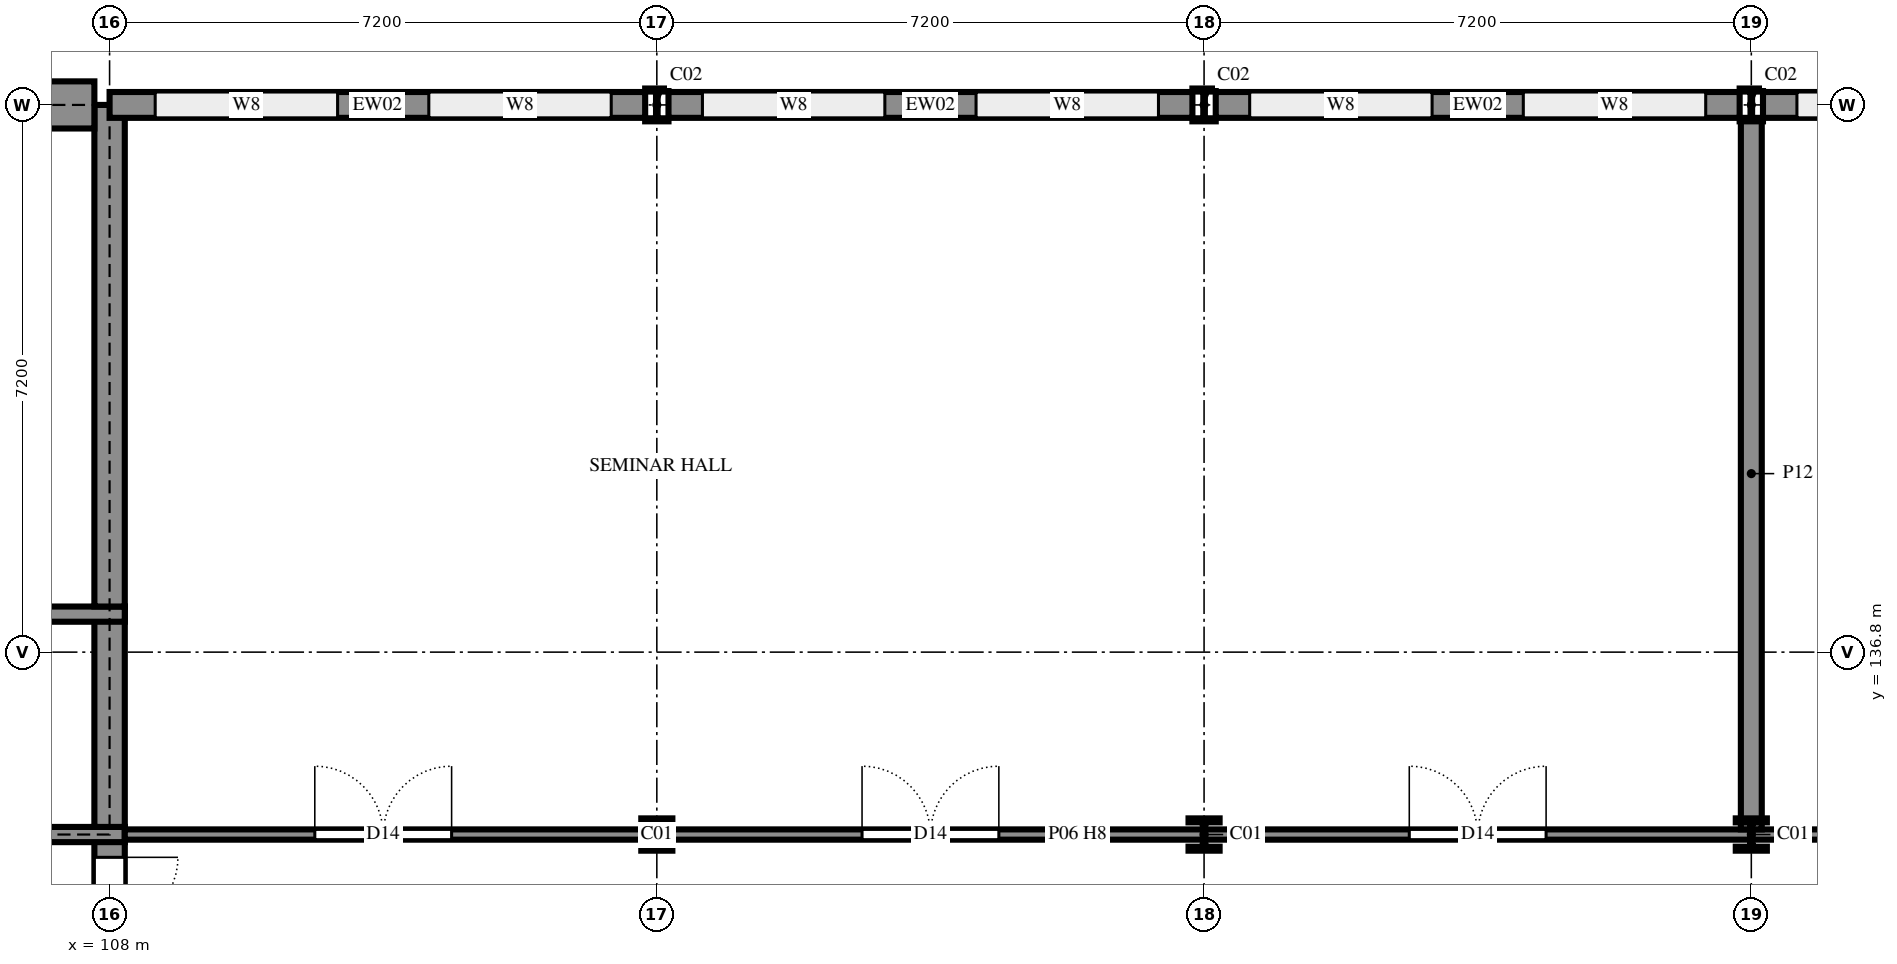
"""IFC4 building model, lengths in metres.
Left out: names, types, materials, properties, quantities, classifications, styles, units other than length and angle.
Written with IfcOpenShell. Run it as: python <this file> out.ifc"""

import sys

from ifc_helpers import new_model, si_unit, direction, frame, frame_2d, origin, origin_2d, place, context, subcontext, project, spatial, rectangle, i_section, extrude, element, fill, save


model = new_model("IFC4")
c1 = context("Model", 3, precision=1e-05, world=origin(), true_north=direction((0.0, 1.0)))
c2 = subcontext(c1, "Body", "Model", "MODEL_VIEW")
j1 = project(units=[si_unit("LENGTHUNIT", "METRE"), si_unit("PLANEANGLEUNIT", "RADIAN")], contexts=[c1])
p1 = place(None, origin())
s1 = spatial("IfcSite", under=j1, at=p1, CompositionType="ELEMENT")
p2 = place(p1, origin())
s2 = spatial("IfcBuilding", under=s1, at=p2, CompositionType="ELEMENT")
p3 = place(p2, frame((0.0, 0.0, 18.0)))
s3 = spatial("IfcBuildingStorey", under=s2, at=p3, CompositionType="ELEMENT", Elevation=18.0)
p4 = place(p3, frame((115.2, 134.4, 0.0), z_axis=(0.0, 0.0, 1.0), x_axis=(1.0, 0.0, 0.0)))
e1 = element("IfcColumn", 1, at=p4, inside=s3, PredefinedType="COLUMN", context=c2, shape_type="SweptSolid", body=[
    extrude(i_section(OverallWidth=0.409, OverallDepth=0.425, WebThickness=0.033, FlangeThickness=0.052, FilletRadius=0.015, at=origin_2d()), origin(), (0.0, 0.0, 1.0), 3.6),
])
p5 = place(p3, frame((115.2, 144.0, 0.0), z_axis=(0.0, 0.0, 1.0), x_axis=(1.0, 0.0, 0.0)))
e2 = element("IfcColumn", 2, at=p5, inside=s3, PredefinedType="COLUMN", context=c2, shape_type="SweptSolid", body=[
    extrude(i_section(OverallWidth=0.307, OverallDepth=0.432, WebThickness=0.021, FlangeThickness=0.04, FilletRadius=0.027, at=origin_2d()), origin(), (0.0, 0.0, 1.0), 3.6),
])
p6 = place(p3, frame((122.4, 134.4, 0.0), z_axis=(0.0, 0.0, 1.0), x_axis=(1.0, 0.0, 0.0)))
e3 = element("IfcColumn", 3, at=p6, inside=s3, PredefinedType="COLUMN", context=c2, shape_type="SweptSolid", body=[
    extrude(i_section(OverallWidth=0.409, OverallDepth=0.425, WebThickness=0.033, FlangeThickness=0.052, FilletRadius=0.015, at=origin_2d()), origin(), (0.0, 0.0, 1.0), 3.6),
])
p7 = place(p3, frame((122.4, 144.0, 0.0), z_axis=(0.0, 0.0, 1.0), x_axis=(1.0, 0.0, 0.0)))
e4 = element("IfcColumn", 4, at=p7, inside=s3, PredefinedType="COLUMN", context=c2, shape_type="SweptSolid", body=[
    extrude(i_section(OverallWidth=0.307, OverallDepth=0.432, WebThickness=0.021, FlangeThickness=0.04, FilletRadius=0.027, at=origin_2d()), origin(), (0.0, 0.0, 1.0), 3.6),
])
p8 = place(p3, frame((129.6, 134.4, 0.0), z_axis=(0.0, 0.0, 1.0), x_axis=(1.0, 0.0, 0.0)))
e5 = element("IfcColumn", 5, at=p8, inside=s3, PredefinedType="COLUMN", context=c2, shape_type="SweptSolid", body=[
    extrude(i_section(OverallWidth=0.409, OverallDepth=0.425, WebThickness=0.033, FlangeThickness=0.052, FilletRadius=0.015, at=origin_2d()), origin(), (0.0, 0.0, 1.0), 3.6),
])
p9 = place(p3, frame((129.6, 144.0, 0.0), z_axis=(0.0, 0.0, 1.0), x_axis=(1.0, 0.0, 0.0)))
e6 = element("IfcColumn", 6, at=p9, inside=s3, PredefinedType="COLUMN", context=c2, shape_type="SweptSolid", body=[
    extrude(i_section(OverallWidth=0.307, OverallDepth=0.432, WebThickness=0.021, FlangeThickness=0.04, FilletRadius=0.027, at=origin_2d()), origin(), (0.0, 0.0, 1.0), 3.6),
])
p10 = place(p3, frame((108.0, 132.0, 0.0), z_axis=(0.0, 0.0, 1.0), x_axis=(0.0, 1.0, 0.0)))
e7 = element("IfcWall", 7, at=p10, inside=s3, PredefinedType="SHEAR", context=c2, shape_type="SweptSolid", body=[
    extrude(rectangle(XDim=2.5, YDim=0.4, at=frame_2d((1.25, 0.0))), origin(), (0.0, 0.0, 1.0), 3.6),
])
p11 = place(p10, frame((0.3, 0.0, 0.0)))
e8 = element("IfcOpeningElement", 8, at=p11, cuts=e7, PredefinedType="OPENING", context=c2, shape_type="SweptSolid", body=[
    extrude(rectangle(XDim=1.8, YDim=2.1, at=frame_2d((0.9, 1.05))), frame((0.0, 0.21, 0.0), z_axis=(0.0, -1.0, 0.0), x_axis=(1.0, 0.0, 0.0)), (0.0, 0.0, 1.0), 0.42),
])
p12 = place(p3, frame((104.1, 134.4, 0.0), z_axis=(0.0, 0.0, 1.0), x_axis=(1.0, 0.0, 0.0)))
e9 = element("IfcWall", 9, at=p12, inside=s3, PredefinedType="SHEAR", context=c2, shape_type="SweptSolid", body=[
    extrude(rectangle(XDim=4.1, YDim=0.2, at=frame_2d((2.05, 0.0))), origin(), (0.0, 0.0, 1.0), 3.6),
])
p13 = place(p12, frame((1.475, 0.0, 0.0)))
e10 = element("IfcOpeningElement", 10, at=p13, cuts=e9, PredefinedType="OPENING", context=c2, shape_type="SweptSolid", body=[
    extrude(rectangle(XDim=0.85, YDim=2.1, at=frame_2d((0.425, 1.05))), frame((0.0, 0.11, 0.0), z_axis=(0.0, -1.0, 0.0), x_axis=(1.0, 0.0, 0.0)), (0.0, 0.0, 1.0), 0.22),
])
p14 = place(p3, frame((108.0, 134.5, 0.0), z_axis=(0.0, 0.0, 1.0), x_axis=(0.0, 1.0, 0.0)))
e11 = element("IfcWall", 11, at=p14, inside=s3, PredefinedType="SHEAR", context=c2, shape_type="SweptSolid", body=[
    extrude(rectangle(XDim=2.9, YDim=0.4, at=frame_2d((1.45, 0.0))), origin(), (0.0, 0.0, 1.0), 3.6),
])
p15 = place(p3, frame((108.2, 137.3, 0.0), z_axis=(0.0, 0.0, 1.0), x_axis=(-1.0, 0.0, 0.0)))
e12 = element("IfcWall", 12, at=p15, inside=s3, PredefinedType="SHEAR", context=c2, shape_type="SweptSolid", body=[
    extrude(rectangle(XDim=4.1, YDim=0.2, at=frame_2d((2.05, 0.0))), origin(), (0.0, 0.0, 1.0), 3.6),
])
p16 = place(p3, frame((108.0, 137.4, 0.0), z_axis=(0.0, 0.0, 1.0), x_axis=(0.0, 1.0, 0.0)))
e13 = element("IfcWall", 13, at=p16, inside=s3, PredefinedType="SHEAR", context=c2, shape_type="SweptSolid", body=[
    extrude(rectangle(XDim=6.6, YDim=0.4, at=frame_2d((3.3, 0.0))), origin(), (0.0, 0.0, 1.0), 3.6),
])
p17 = place(p3, frame((133.4, 144.0, 0.0), z_axis=(0.0, 0.0, 1.0), x_axis=(-1.0, 0.0, 0.0)))
e14 = element("IfcWall", 14, at=p17, inside=s3, PredefinedType="SOLIDWALL", context=c2, shape_type="SweptSolid", body=[
    extrude(rectangle(XDim=3.646, YDim=0.34, at=frame_2d((1.823, 0.0))), origin(), (0.0, 0.0, 1.0), 3.26),
])
p18 = place(p17, frame((0.8, 0.0, 0.9)))
e15 = element("IfcOpeningElement", 15, at=p18, cuts=e14, PredefinedType="OPENING", context=c2, shape_type="SweptSolid", body=[
    extrude(rectangle(XDim=2.4, YDim=1.8, at=frame_2d((1.2, 0.9))), frame((0.0, 0.18, 0.0), z_axis=(0.0, -1.0, 0.0), x_axis=(1.0, 0.0, 0.0)), (0.0, 0.0, 1.0), 0.36),
])
p19 = place(p3, frame((129.447, 144.0, 0.0), z_axis=(0.0, 0.0, 1.0), x_axis=(-1.0, 0.0, 0.0)))
e16 = element("IfcWall", 16, at=p19, inside=s3, PredefinedType="SOLIDWALL", context=c2, shape_type="SweptSolid", body=[
    extrude(rectangle(XDim=6.893, YDim=0.34, at=frame_2d((3.447, 0.0))), origin(), (0.0, 0.0, 1.0), 3.16),
])
p20 = place(p19, frame((4.046, 0.0, 0.9)))
e17 = element("IfcOpeningElement", 17, at=p20, cuts=e16, PredefinedType="OPENING", context=c2, shape_type="SweptSolid", body=[
    extrude(rectangle(XDim=2.4, YDim=1.8, at=frame_2d((1.2, 0.9))), frame((0.0, 0.18, 0.0), z_axis=(0.0, -1.0, 0.0), x_axis=(1.0, 0.0, 0.0)), (0.0, 0.0, 1.0), 0.36),
])
p21 = place(p19, frame((0.447, 0.0, 0.9)))
e18 = element("IfcOpeningElement", 18, at=p21, cuts=e16, PredefinedType="OPENING", context=c2, shape_type="SweptSolid", body=[
    extrude(rectangle(XDim=2.4, YDim=1.8, at=frame_2d((1.2, 0.9))), frame((0.0, 0.18, 0.0), z_axis=(0.0, -1.0, 0.0), x_axis=(1.0, 0.0, 0.0)), (0.0, 0.0, 1.0), 0.36),
])
p22 = place(p3, frame((122.247, 144.0, 0.0), z_axis=(0.0, 0.0, 1.0), x_axis=(-1.0, 0.0, 0.0)))
e19 = element("IfcWall", 19, at=p22, inside=s3, PredefinedType="SOLIDWALL", context=c2, shape_type="SweptSolid", body=[
    extrude(rectangle(XDim=6.893, YDim=0.34, at=frame_2d((3.447, 0.0))), origin(), (0.0, 0.0, 1.0), 3.16),
])
p23 = place(p22, frame((4.046, 0.0, 0.9)))
e20 = element("IfcOpeningElement", 20, at=p23, cuts=e19, PredefinedType="OPENING", context=c2, shape_type="SweptSolid", body=[
    extrude(rectangle(XDim=2.4, YDim=1.8, at=frame_2d((1.2, 0.9))), frame((0.0, 0.18, 0.0), z_axis=(0.0, -1.0, 0.0), x_axis=(1.0, 0.0, 0.0)), (0.0, 0.0, 1.0), 0.36),
])
p24 = place(p22, frame((0.447, 0.0, 0.9)))
e21 = element("IfcOpeningElement", 21, at=p24, cuts=e19, PredefinedType="OPENING", context=c2, shape_type="SweptSolid", body=[
    extrude(rectangle(XDim=2.4, YDim=1.8, at=frame_2d((1.2, 0.9))), frame((0.0, 0.18, 0.0), z_axis=(0.0, -1.0, 0.0), x_axis=(1.0, 0.0, 0.0)), (0.0, 0.0, 1.0), 0.36),
])
p25 = place(p3, frame((115.046, 144.0, 0.0), z_axis=(0.0, 0.0, 1.0), x_axis=(-1.0, 0.0, 0.0)))
e22 = element("IfcWall", 22, at=p25, inside=s3, PredefinedType="SOLIDWALL", context=c2, shape_type="SweptSolid", body=[
    extrude(rectangle(XDim=7.046, YDim=0.34, at=frame_2d((3.523, 0.0))), origin(), (0.0, 0.0, 1.0), 3.16),
])
p26 = place(p25, frame((4.046, 0.0, 0.9)))
e23 = element("IfcOpeningElement", 23, at=p26, cuts=e22, PredefinedType="OPENING", context=c2, shape_type="SweptSolid", body=[
    extrude(rectangle(XDim=2.4, YDim=1.8, at=frame_2d((1.2, 0.9))), frame((0.0, 0.18, 0.0), z_axis=(0.0, -1.0, 0.0), x_axis=(1.0, 0.0, 0.0)), (0.0, 0.0, 1.0), 0.36),
])
p27 = place(p25, frame((0.447, 0.0, 0.9)))
e24 = element("IfcOpeningElement", 24, at=p27, cuts=e22, PredefinedType="OPENING", context=c2, shape_type="SweptSolid", body=[
    extrude(rectangle(XDim=2.4, YDim=1.8, at=frame_2d((1.2, 0.9))), frame((0.0, 0.18, 0.0), z_axis=(0.0, -1.0, 0.0), x_axis=(1.0, 0.0, 0.0)), (0.0, 0.0, 1.0), 0.36),
])
p28 = place(p3, frame((107.8, 144.0, 0.0), z_axis=(0.0, 0.0, 1.0), x_axis=(-1.0, 0.0, 0.0)))
e25 = element("IfcWall", 25, at=p28, inside=s3, PredefinedType="SOLIDWALL", context=c2, shape_type="SweptSolid", body=[
    extrude(rectangle(XDim=1.2, YDim=0.62, at=frame_2d((0.6, 0.0))), origin(), (0.0, 0.0, 1.0), 3.46),
])
p29 = place(p3, frame((108.2, 134.4, 0.0), z_axis=(0.0, 0.0, 1.0), x_axis=(1.0, 0.0, 0.0)))
e26 = element("IfcWall", 26, at=p29, inside=s3, PredefinedType="PARTITIONING", context=c2, shape_type="SweptSolid", body=[
    extrude(rectangle(XDim=25.07, YDim=0.135, at=frame_2d((12.535, 0.0))), origin(), (0.0, 0.0, 1.0), 3.16),
])
p30 = place(p29, frame((2.5, 0.0, 0.0)))
e27 = element("IfcOpeningElement", 27, at=p30, cuts=e26, PredefinedType="OPENING", context=c2, shape_type="SweptSolid", body=[
    extrude(rectangle(XDim=1.8, YDim=2.1, at=frame_2d((0.9, 1.05))), frame((0.0, 0.077, 0.0), z_axis=(0.0, -1.0, 0.0), x_axis=(1.0, 0.0, 0.0)), (0.0, 0.0, 1.0), 0.155),
])
p31 = place(p29, frame((9.7, 0.0, 0.0)))
e28 = element("IfcOpeningElement", 28, at=p31, cuts=e26, PredefinedType="OPENING", context=c2, shape_type="SweptSolid", body=[
    extrude(rectangle(XDim=1.8, YDim=2.1, at=frame_2d((0.9, 1.05))), frame((0.0, 0.077, 0.0), z_axis=(0.0, -1.0, 0.0), x_axis=(1.0, 0.0, 0.0)), (0.0, 0.0, 1.0), 0.155),
])
p32 = place(p29, frame((16.9, 0.0, 0.0)))
e29 = element("IfcOpeningElement", 29, at=p32, cuts=e26, PredefinedType="OPENING", context=c2, shape_type="SweptSolid", body=[
    extrude(rectangle(XDim=1.8, YDim=2.1, at=frame_2d((0.9, 1.05))), frame((0.0, 0.077, 0.0), z_axis=(0.0, -1.0, 0.0), x_axis=(1.0, 0.0, 0.0)), (0.0, 0.0, 1.0), 0.155),
])
p33 = place(p29, frame((22.7, 0.0, 0.0)))
e30 = element("IfcOpeningElement", 30, at=p33, cuts=e26, PredefinedType="OPENING", context=c2, shape_type="SweptSolid", body=[
    extrude(rectangle(XDim=1.0, YDim=2.4, at=frame_2d((0.5, 1.2))), frame((0.0, 0.077, 0.0), z_axis=(0.0, -1.0, 0.0), x_axis=(1.0, 0.0, 0.0)), (0.0, 0.0, 1.0), 0.155),
])
p34 = place(p3, frame((129.6, 134.468, 0.0), z_axis=(0.0, 0.0, 1.0), x_axis=(0.0, 1.0, 0.0)))
e31 = element("IfcWall", 31, at=p34, inside=s3, PredefinedType="PARTITIONING", context=c2, shape_type="SweptSolid", body=[
    extrude(rectangle(XDim=9.363, YDim=0.275, at=frame_2d((4.681, 0.0))), origin(), (0.0, 0.0, 1.0), 3.06),
])
p35 = place(p18, origin())
e32 = element("IfcWindow", 32, at=p35, inside=s3, PartitioningType="SINGLE_PANEL", PredefinedType="WINDOW", context=c2, shape_type="SweptSolid", body=[
    extrude(rectangle(XDim=2.4, YDim=1.8, at=frame_2d((1.2, 0.9))), frame((0.0, 0.03, 0.0), z_axis=(0.0, -1.0, 0.0), x_axis=(1.0, 0.0, 0.0)), (0.0, 0.0, 1.0), 0.06),
])
fill(e15, e32)
p36 = place(p20, origin())
e33 = element("IfcWindow", 33, at=p36, inside=s3, PartitioningType="SINGLE_PANEL", PredefinedType="WINDOW", context=c2, shape_type="SweptSolid", body=[
    extrude(rectangle(XDim=2.4, YDim=1.8, at=frame_2d((1.2, 0.9))), frame((0.0, 0.03, 0.0), z_axis=(0.0, -1.0, 0.0), x_axis=(1.0, 0.0, 0.0)), (0.0, 0.0, 1.0), 0.06),
])
fill(e17, e33)
p37 = place(p21, origin())
e34 = element("IfcWindow", 34, at=p37, inside=s3, PartitioningType="SINGLE_PANEL", PredefinedType="WINDOW", context=c2, shape_type="SweptSolid", body=[
    extrude(rectangle(XDim=2.4, YDim=1.8, at=frame_2d((1.2, 0.9))), frame((0.0, 0.03, 0.0), z_axis=(0.0, -1.0, 0.0), x_axis=(1.0, 0.0, 0.0)), (0.0, 0.0, 1.0), 0.06),
])
fill(e18, e34)
p38 = place(p23, origin())
e35 = element("IfcWindow", 35, at=p38, inside=s3, PartitioningType="SINGLE_PANEL", PredefinedType="WINDOW", context=c2, shape_type="SweptSolid", body=[
    extrude(rectangle(XDim=2.4, YDim=1.8, at=frame_2d((1.2, 0.9))), frame((0.0, 0.03, 0.0), z_axis=(0.0, -1.0, 0.0), x_axis=(1.0, 0.0, 0.0)), (0.0, 0.0, 1.0), 0.06),
])
fill(e20, e35)
p39 = place(p24, origin())
e36 = element("IfcWindow", 36, at=p39, inside=s3, PartitioningType="SINGLE_PANEL", PredefinedType="WINDOW", context=c2, shape_type="SweptSolid", body=[
    extrude(rectangle(XDim=2.4, YDim=1.8, at=frame_2d((1.2, 0.9))), frame((0.0, 0.03, 0.0), z_axis=(0.0, -1.0, 0.0), x_axis=(1.0, 0.0, 0.0)), (0.0, 0.0, 1.0), 0.06),
])
fill(e21, e36)
p40 = place(p26, origin())
e37 = element("IfcWindow", 37, at=p40, inside=s3, PartitioningType="SINGLE_PANEL", PredefinedType="WINDOW", context=c2, shape_type="SweptSolid", body=[
    extrude(rectangle(XDim=2.4, YDim=1.8, at=frame_2d((1.2, 0.9))), frame((0.0, 0.03, 0.0), z_axis=(0.0, -1.0, 0.0), x_axis=(1.0, 0.0, 0.0)), (0.0, 0.0, 1.0), 0.06),
])
fill(e23, e37)
p41 = place(p27, origin())
e38 = element("IfcWindow", 38, at=p41, inside=s3, PartitioningType="SINGLE_PANEL", PredefinedType="WINDOW", context=c2, shape_type="SweptSolid", body=[
    extrude(rectangle(XDim=2.4, YDim=1.8, at=frame_2d((1.2, 0.9))), frame((0.0, 0.03, 0.0), z_axis=(0.0, -1.0, 0.0), x_axis=(1.0, 0.0, 0.0)), (0.0, 0.0, 1.0), 0.06),
])
fill(e24, e38)
p42 = place(p30, origin())
e39 = element("IfcDoor", 39, at=p42, inside=s3, OperationType="DOUBLE_DOOR_SINGLE_SWING", PredefinedType="DOOR", context=c2, shape_type="SweptSolid", body=[
    extrude(rectangle(XDim=1.8, YDim=2.1, at=frame_2d((0.9, 1.05))), frame((0.0, 0.025, 0.0), z_axis=(0.0, -1.0, 0.0), x_axis=(1.0, 0.0, 0.0)), (0.0, 0.0, 1.0), 0.05),
])
fill(e27, e39)
p43 = place(p31, origin())
e40 = element("IfcDoor", 40, at=p43, inside=s3, OperationType="DOUBLE_DOOR_SINGLE_SWING", PredefinedType="DOOR", context=c2, shape_type="SweptSolid", body=[
    extrude(rectangle(XDim=1.8, YDim=2.1, at=frame_2d((0.9, 1.05))), frame((0.0, 0.025, 0.0), z_axis=(0.0, -1.0, 0.0), x_axis=(1.0, 0.0, 0.0)), (0.0, 0.0, 1.0), 0.05),
])
fill(e28, e40)
p44 = place(p32, origin())
e41 = element("IfcDoor", 41, at=p44, inside=s3, OperationType="DOUBLE_DOOR_SINGLE_SWING", PredefinedType="DOOR", context=c2, shape_type="SweptSolid", body=[
    extrude(rectangle(XDim=1.8, YDim=2.1, at=frame_2d((0.9, 1.05))), frame((0.0, 0.025, 0.0), z_axis=(0.0, -1.0, 0.0), x_axis=(1.0, 0.0, 0.0)), (0.0, 0.0, 1.0), 0.05),
])
fill(e29, e41)
p45 = place(p11, frame((1.8, 0.0, 0.0), z_axis=(0.0, 0.0, 1.0), x_axis=(-1.0, 0.0, 0.0)))
e42 = element("IfcDoor", 42, at=p45, inside=s3, OperationType="DOUBLE_DOOR_SINGLE_SWING", PredefinedType="DOOR", context=c2, shape_type="SweptSolid", body=[
    extrude(rectangle(XDim=1.8, YDim=2.1, at=frame_2d((0.9, 1.05))), frame((0.0, 0.025, 0.0), z_axis=(0.0, -1.0, 0.0), x_axis=(1.0, 0.0, 0.0)), (0.0, 0.0, 1.0), 0.05),
])
fill(e8, e42)
save(model, sys.argv[1])
